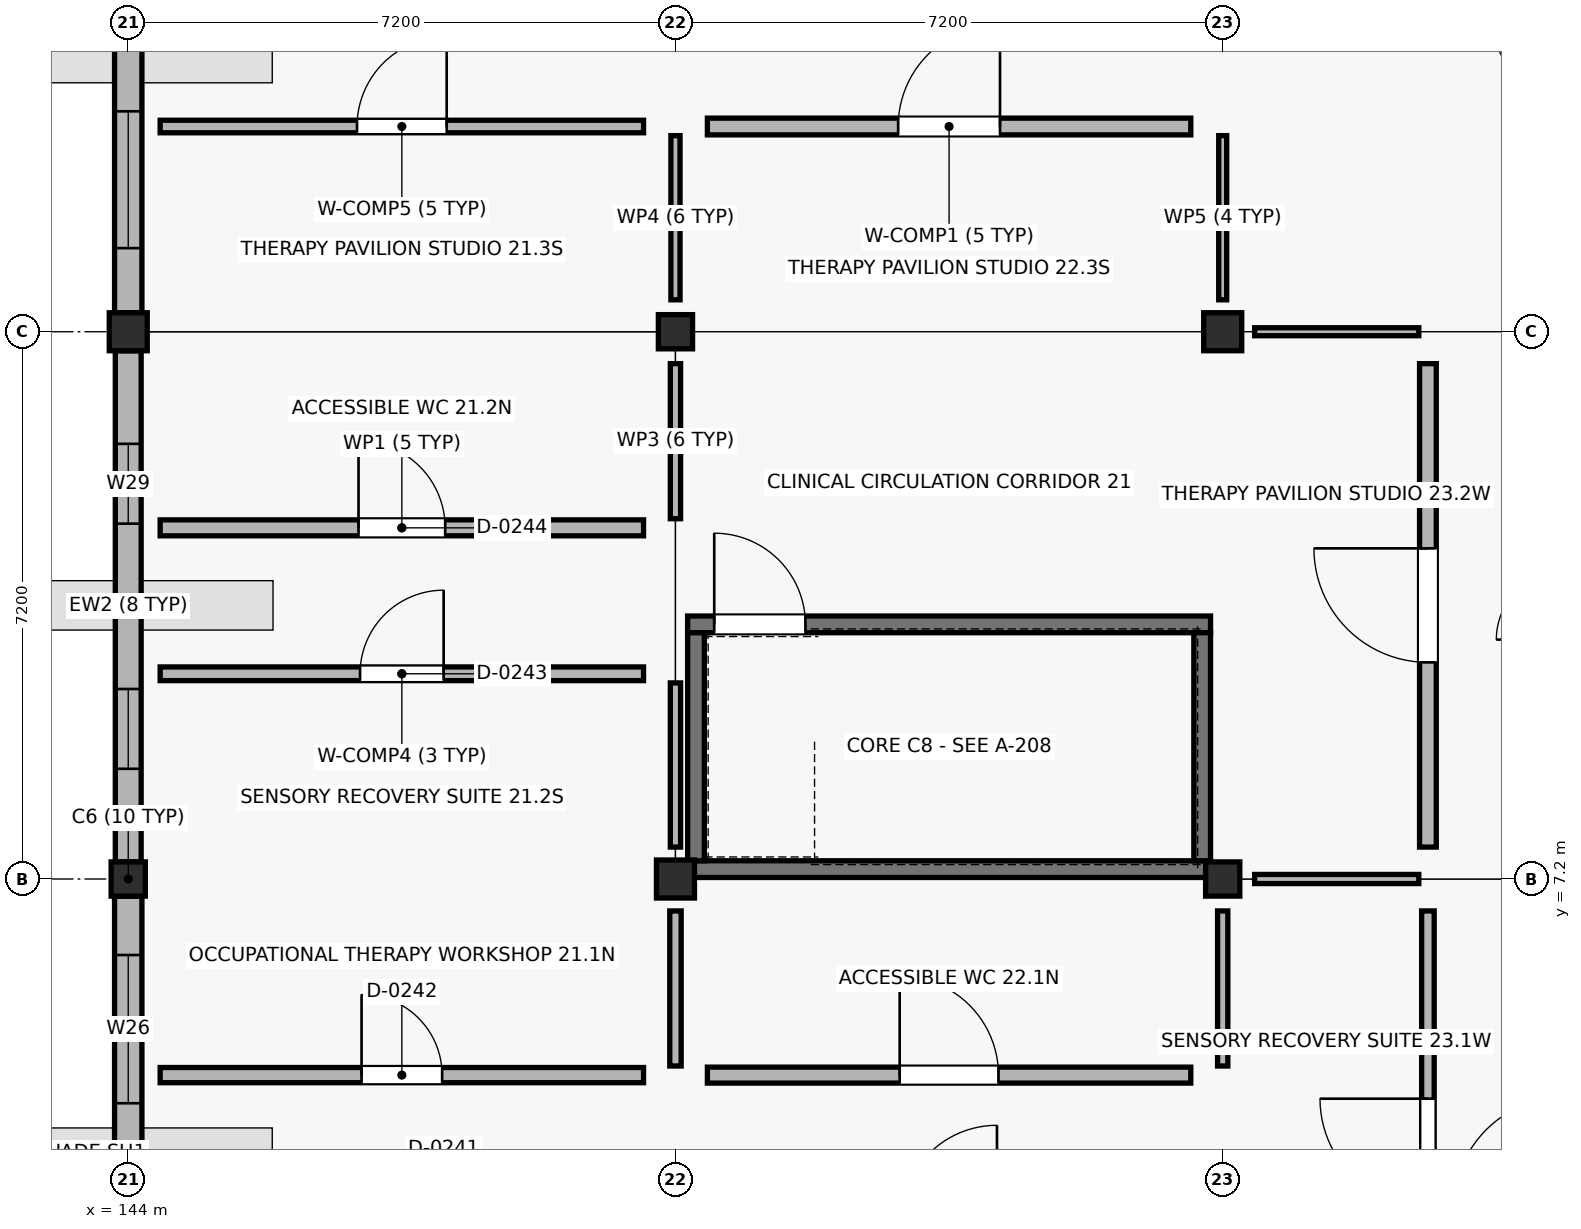
"""IFC4 building model, lengths in metres.
Left out: names, types, materials, properties, quantities, classifications, styles, units other than length and angle.
Written with IfcOpenShell. Run it as: python <this file> out.ifc"""

import sys

from ifc_helpers import new_model, si_unit, direction, frame, frame_2d, origin, origin_2d, place, context, subcontext, project, spatial, rectangle, extrude, element, fill, save


model = new_model("IFC4")
c1 = context("Model", 3, precision=1e-05, world=origin(), true_north=direction((0.0, 1.0)))
c2 = subcontext(c1, "Body", "Model", "MODEL_VIEW")
j1 = project(units=[si_unit("LENGTHUNIT", "METRE"), si_unit("PLANEANGLEUNIT", "RADIAN")], contexts=[c1])
p1 = place(None, origin())
s1 = spatial("IfcSite", under=j1, at=p1, CompositionType="ELEMENT")
p2 = place(p1, origin())
s2 = spatial("IfcBuilding", under=s1, at=p2, CompositionType="ELEMENT")
p3 = place(p2, frame((0.0, 0.0, 4.5)))
s3 = spatial("IfcBuildingStorey", under=s2, at=p3, CompositionType="ELEMENT", Elevation=4.5)
p4 = place(p3, frame((144.0, 7.2, 0.0), z_axis=(0.0, 0.0, 1.0), x_axis=(1.0, 0.0, 0.0)))
e1 = element("IfcColumn", 1, at=p4, inside=s3, PredefinedType="COLUMN", context=c2, shape_type="SweptSolid", body=[
    extrude(rectangle(XDim=0.45, YDim=0.45, at=origin_2d()), origin(), (0.0, 0.0, 1.0), 4.28),
])
for number, where, z_axis, x_axis in (
    (2, (144.0, 14.4, 0.0), (0.0, 0.0, 1.0), (1.0, 0.0, 0.0)),
    (3, (151.2, 7.2, 0.0), (0.0, 0.0, 1.0), (1.0, 0.0, 0.0)),
):
    element("IfcColumn", number, at=place(p3, frame(where, z_axis=z_axis, x_axis=x_axis)), inside=s3, PredefinedType="COLUMN", context=c2, shape_type="SweptSolid", body=[
        extrude(rectangle(XDim=0.5, YDim=0.5, at=origin_2d()), origin(), (0.0, 0.0, 1.0), 4.28),
    ])
for number, where, z_axis, x_axis in (
    (4, (151.2, 14.4, 0.0), (0.0, 0.0, 1.0), (1.0, 0.0, 0.0)),
    (5, (158.4, 7.2, 0.0), (0.0, 0.0, 1.0), (1.0, 0.0, 0.0)),
):
    element("IfcColumn", number, at=place(p3, frame(where, z_axis=z_axis, x_axis=x_axis)), inside=s3, PredefinedType="COLUMN", context=c2, shape_type="SweptSolid", body=[
        extrude(rectangle(XDim=0.45, YDim=0.45, at=origin_2d()), origin(), (0.0, 0.0, 1.0), 4.28),
    ])
p5 = place(p3, frame((158.4, 14.4, 0.0), z_axis=(0.0, 0.0, 1.0), x_axis=(1.0, 0.0, 0.0)))
e6 = element("IfcColumn", 6, at=p5, inside=s3, PredefinedType="COLUMN", context=c2, shape_type="SweptSolid", body=[
    extrude(rectangle(XDim=0.5, YDim=0.5, at=origin_2d()), origin(), (0.0, 0.0, 1.0), 4.28),
])
p6 = place(p3, frame((144.0, 6.975, 0.0), z_axis=(0.0, 0.0, 1.0), x_axis=(0.0, -1.0, 0.0)))
e7 = element("IfcWall", 7, at=p6, inside=s3, PredefinedType="SOLIDWALL", context=c2, shape_type="SweptSolid", body=[
    extrude(rectangle(XDim=6.725, YDim=0.36, at=frame_2d((3.363, 0.0))), origin(), (0.0, 0.0, 1.0), 3.52),
])
p7 = place(p6, frame((0.775, 0.0, 0.9)))
e8 = element("IfcOpeningElement", 8, at=p7, cuts=e7, PredefinedType="OPENING", context=c2, shape_type="SweptSolid", body=[
    extrude(rectangle(XDim=1.95, YDim=1.5, at=frame_2d((0.975, 0.75))), frame((0.0, 0.19, 0.0), z_axis=(0.0, -1.0, 0.0), x_axis=(1.0, 0.0, 0.0)), (0.0, 0.0, 1.0), 0.38),
])
p8 = place(p6, frame((4.0, 0.0, 0.9)))
e9 = element("IfcOpeningElement", 9, at=p8, cuts=e7, PredefinedType="OPENING", context=c2, shape_type="SweptSolid", body=[
    extrude(rectangle(XDim=1.95, YDim=1.5, at=frame_2d((0.975, 0.75))), frame((0.0, 0.19, 0.0), z_axis=(0.0, -1.0, 0.0), x_axis=(1.0, 0.0, 0.0)), (0.0, 0.0, 1.0), 0.38),
])
p9 = place(p3, frame((144.0, 14.15, 0.0), z_axis=(0.0, 0.0, 1.0), x_axis=(0.0, -1.0, 0.0)))
e10 = element("IfcWall", 10, at=p9, inside=s3, PredefinedType="SOLIDWALL", context=c2, shape_type="SweptSolid", body=[
    extrude(rectangle(XDim=6.725, YDim=0.34, at=frame_2d((3.362, 0.0))), origin(), (0.0, 0.0, 1.0), 3.52),
])
p10 = place(p9, frame((1.225, 0.0, 0.9)))
e11 = element("IfcOpeningElement", 11, at=p10, cuts=e10, PredefinedType="OPENING", context=c2, shape_type="SweptSolid", body=[
    extrude(rectangle(XDim=1.05, YDim=1.62, at=frame_2d((0.525, 0.81))), frame((0.0, 0.18, 0.0), z_axis=(0.0, -1.0, 0.0), x_axis=(1.0, 0.0, 0.0)), (0.0, 0.0, 1.0), 0.36),
])
p11 = place(p9, frame((4.45, 0.0, 0.9)))
e12 = element("IfcOpeningElement", 12, at=p11, cuts=e10, PredefinedType="OPENING", context=c2, shape_type="SweptSolid", body=[
    extrude(rectangle(XDim=1.05, YDim=1.62, at=frame_2d((0.525, 0.81))), frame((0.0, 0.18, 0.0), z_axis=(0.0, -1.0, 0.0), x_axis=(1.0, 0.0, 0.0)), (0.0, 0.0, 1.0), 0.36),
])
p12 = place(p3, frame((144.0, 21.375, 0.0), z_axis=(0.0, 0.0, 1.0), x_axis=(0.0, -1.0, 0.0)))
e13 = element("IfcWall", 13, at=p12, inside=s3, PredefinedType="SOLIDWALL", context=c2, shape_type="SweptSolid", body=[
    extrude(rectangle(XDim=6.725, YDim=0.36, at=frame_2d((3.363, 0.0))), origin(), (0.0, 0.0, 1.0), 3.52),
])
p13 = place(p12, frame((0.85, 0.0, 0.9)))
e14 = element("IfcOpeningElement", 14, at=p13, cuts=e13, PredefinedType="OPENING", context=c2, shape_type="SweptSolid", body=[
    extrude(rectangle(XDim=1.8, YDim=1.62, at=frame_2d((0.9, 0.81))), frame((0.0, 0.19, 0.0), z_axis=(0.0, -1.0, 0.0), x_axis=(1.0, 0.0, 0.0)), (0.0, 0.0, 1.0), 0.38),
])
p14 = place(p12, frame((4.075, 0.0, 0.9)))
e15 = element("IfcOpeningElement", 15, at=p14, cuts=e13, PredefinedType="OPENING", context=c2, shape_type="SweptSolid", body=[
    extrude(rectangle(XDim=1.8, YDim=1.62, at=frame_2d((0.9, 0.81))), frame((0.0, 0.19, 0.0), z_axis=(0.0, -1.0, 0.0), x_axis=(1.0, 0.0, 0.0)), (0.0, 0.0, 1.0), 0.38),
])
p15 = place(p3, frame((151.36, 7.33, 0.0), z_axis=(0.0, 0.0, 1.0), x_axis=(1.0, 0.0, 0.0)))
e16 = element("IfcWall", 16, at=p15, inside=s3, PredefinedType="SHEAR", context=c2, shape_type="SweptSolid", body=[
    extrude(rectangle(XDim=6.88, YDim=0.22, at=frame_2d((3.44, 0.0))), origin(), (0.0, 0.0, 1.0), 4.22),
])
p16 = place(p3, frame((151.36, 10.55, 0.0), z_axis=(0.0, 0.0, 1.0), x_axis=(1.0, 0.0, 0.0)))
e17 = element("IfcWall", 17, at=p16, inside=s3, PredefinedType="SHEAR", context=c2, shape_type="SweptSolid", body=[
    extrude(rectangle(XDim=6.88, YDim=0.22, at=frame_2d((3.44, 0.0))), origin(), (0.0, 0.0, 1.0), 4.22),
])
p17 = place(p16, frame((0.35, 0.0, 0.0)))
e18 = element("IfcOpeningElement", 18, at=p17, cuts=e17, PredefinedType="OPENING", context=c2, shape_type="SweptSolid", body=[
    extrude(rectangle(XDim=1.2, YDim=2.15, at=frame_2d((0.6, 1.075))), frame((0.0, 0.12, 0.0), z_axis=(0.0, -1.0, 0.0), x_axis=(1.0, 0.0, 0.0)), (0.0, 0.0, 1.0), 0.24),
])
for number, where, z_axis, x_axis in (
    (19, (151.47, 7.44, 0.0), (0.0, 0.0, 1.0), (0.0, 1.0, 0.0)),
    (20, (158.13, 7.44, 0.0), (0.0, 0.0, 1.0), (0.0, 1.0, 0.0)),
):
    element("IfcWall", number, at=place(p3, frame(where, z_axis=z_axis, x_axis=x_axis)), inside=s3, PredefinedType="SHEAR", context=c2, shape_type="SweptSolid", body=[
        extrude(rectangle(XDim=3.0, YDim=0.22, at=frame_2d((1.5, 0.0))), origin(), (0.0, 0.0, 1.0), 4.22),
    ])
p18 = place(p3, frame((144.42, 4.62, 0.0), z_axis=(0.0, 0.0, 1.0), x_axis=(1.0, 0.0, 0.0)))
e21 = element("IfcWall", 21, at=p18, inside=s3, PredefinedType="SOLIDWALL", context=c2, shape_type="SweptSolid", body=[
    extrude(rectangle(XDim=6.36, YDim=0.2, at=frame_2d((3.18, 0.0))), origin(), (0.0, 0.0, 1.0), 3.36),
])
p19 = place(p18, frame((2.65, 0.0, 0.0)))
e22 = element("IfcOpeningElement", 22, at=p19, cuts=e21, PredefinedType="OPENING", context=c2, shape_type="SweptSolid", body=[
    extrude(rectangle(XDim=1.06, YDim=2.09, at=frame_2d((0.53, 1.045))), frame((0.0, 0.11, 0.0), z_axis=(0.0, -1.0, 0.0), x_axis=(1.0, 0.0, 0.0)), (0.0, 0.0, 1.0), 0.22),
])
p20 = place(p3, frame((151.2, 4.74, 0.0), z_axis=(0.0, 0.0, 1.0), x_axis=(0.0, 1.0, 0.0)))
e23 = element("IfcWall", 23, at=p20, inside=s3, PredefinedType="PARTITIONING", context=c2, shape_type="SweptSolid", body=[
    extrude(rectangle(XDim=2.04, YDim=0.15, at=frame_2d((1.02, 0.0))), origin(), (0.0, 0.0, 1.0), 3.36),
])
p21 = place(p3, frame((144.42, 9.9, 0.0), z_axis=(0.0, 0.0, 1.0), x_axis=(1.0, 0.0, 0.0)))
e24 = element("IfcWall", 24, at=p21, inside=s3, PredefinedType="PARTITIONING", context=c2, shape_type="SweptSolid", body=[
    extrude(rectangle(XDim=6.36, YDim=0.18, at=frame_2d((3.18, 0.0))), origin(), (0.0, 0.0, 1.0), 3.36),
])
p22 = place(p21, frame((2.63, 0.0, 0.0)))
e25 = element("IfcOpeningElement", 25, at=p22, cuts=e24, PredefinedType="OPENING", context=c2, shape_type="SweptSolid", body=[
    extrude(rectangle(XDim=1.1, YDim=2.09, at=frame_2d((0.55, 1.045))), frame((0.0, 0.1, 0.0), z_axis=(0.0, -1.0, 0.0), x_axis=(1.0, 0.0, 0.0)), (0.0, 0.0, 1.0), 0.2),
])
p23 = place(p3, frame((151.2, 7.62, 0.0), z_axis=(0.0, 0.0, 1.0), x_axis=(0.0, 1.0, 0.0)))
e26 = element("IfcWall", 26, at=p23, inside=s3, PredefinedType="PARTITIONING", context=c2, shape_type="SweptSolid", body=[
    extrude(rectangle(XDim=2.16, YDim=0.135, at=frame_2d((1.08, 0.0))), origin(), (0.0, 0.0, 1.0), 3.36),
])
p24 = place(p3, frame((144.42, 11.82, 0.0), z_axis=(0.0, 0.0, 1.0), x_axis=(1.0, 0.0, 0.0)))
e27 = element("IfcWall", 27, at=p24, inside=s3, PredefinedType="PLUMBINGWALL", context=c2, shape_type="SweptSolid", body=[
    extrude(rectangle(XDim=6.36, YDim=0.21, at=frame_2d((3.18, 0.0))), origin(), (0.0, 0.0, 1.0), 3.36),
])
p25 = place(p24, frame((2.61, 0.0, 0.0)))
e28 = element("IfcOpeningElement", 28, at=p25, cuts=e27, PredefinedType="OPENING", context=c2, shape_type="SweptSolid", body=[
    extrude(rectangle(XDim=1.14, YDim=2.09, at=frame_2d((0.57, 1.045))), frame((0.0, 0.115, 0.0), z_axis=(0.0, -1.0, 0.0), x_axis=(1.0, 0.0, 0.0)), (0.0, 0.0, 1.0), 0.23),
])
p26 = place(p3, frame((151.2, 11.94, 0.0), z_axis=(0.0, 0.0, 1.0), x_axis=(0.0, 1.0, 0.0)))
e29 = element("IfcWall", 29, at=p26, inside=s3, PredefinedType="PARTITIONING", context=c2, shape_type="SweptSolid", body=[
    extrude(rectangle(XDim=2.04, YDim=0.135, at=frame_2d((1.02, 0.0))), origin(), (0.0, 0.0, 1.0), 3.36),
])
p27 = place(p3, frame((144.42, 17.1, 0.0), z_axis=(0.0, 0.0, 1.0), x_axis=(1.0, 0.0, 0.0)))
e30 = element("IfcWall", 30, at=p27, inside=s3, PredefinedType="PARTITIONING", context=c2, shape_type="SweptSolid", body=[
    extrude(rectangle(XDim=6.36, YDim=0.165, at=frame_2d((3.18, 0.0))), origin(), (0.0, 0.0, 1.0), 3.36),
])
p28 = place(p27, frame((2.59, 0.0, 0.0)))
e31 = element("IfcOpeningElement", 31, at=p28, cuts=e30, PredefinedType="OPENING", context=c2, shape_type="SweptSolid", body=[
    extrude(rectangle(XDim=1.18, YDim=2.09, at=frame_2d((0.59, 1.045))), frame((0.0, 0.093, 0.0), z_axis=(0.0, -1.0, 0.0), x_axis=(1.0, 0.0, 0.0)), (0.0, 0.0, 1.0), 0.185),
])
p29 = place(p3, frame((151.2, 14.82, 0.0), z_axis=(0.0, 0.0, 1.0), x_axis=(0.0, 1.0, 0.0)))
e32 = element("IfcWall", 32, at=p29, inside=s3, PredefinedType="PARTITIONING", context=c2, shape_type="SweptSolid", body=[
    extrude(rectangle(XDim=2.16, YDim=0.12, at=frame_2d((1.08, 0.0))), origin(), (0.0, 0.0, 1.0), 3.36),
])
p30 = place(p3, frame((151.62, 4.62, 0.0), z_axis=(0.0, 0.0, 1.0), x_axis=(1.0, 0.0, 0.0)))
e33 = element("IfcWall", 33, at=p30, inside=s3, PredefinedType="PLUMBINGWALL", context=c2, shape_type="SweptSolid", body=[
    extrude(rectangle(XDim=6.36, YDim=0.21, at=frame_2d((3.18, 0.0))), origin(), (0.0, 0.0, 1.0), 3.36),
])
p31 = place(p30, frame((2.53, 0.0, 0.0)))
e34 = element("IfcOpeningElement", 34, at=p31, cuts=e33, PredefinedType="OPENING", context=c2, shape_type="SweptSolid", body=[
    extrude(rectangle(XDim=1.3, YDim=2.09, at=frame_2d((0.65, 1.045))), frame((0.0, 0.115, 0.0), z_axis=(0.0, -1.0, 0.0), x_axis=(1.0, 0.0, 0.0)), (0.0, 0.0, 1.0), 0.23),
])
p32 = place(p3, frame((158.4, 4.74, 0.0), z_axis=(0.0, 0.0, 1.0), x_axis=(0.0, 1.0, 0.0)))
e35 = element("IfcWall", 35, at=p32, inside=s3, PredefinedType="PARTITIONING", context=c2, shape_type="SweptSolid", body=[
    extrude(rectangle(XDim=2.04, YDim=0.135, at=frame_2d((1.02, 0.0))), origin(), (0.0, 0.0, 1.0), 3.36),
])
p33 = place(p3, frame((151.62, 17.1, 0.0), z_axis=(0.0, 0.0, 1.0), x_axis=(1.0, 0.0, 0.0)))
e36 = element("IfcWall", 36, at=p33, inside=s3, PredefinedType="SOLIDWALL", context=c2, shape_type="SweptSolid", body=[
    extrude(rectangle(XDim=6.36, YDim=0.22, at=frame_2d((3.18, 0.0))), origin(), (0.0, 0.0, 1.0), 3.36),
])
p34 = place(p33, frame((2.51, 0.0, 0.0)))
e37 = element("IfcOpeningElement", 37, at=p34, cuts=e36, PredefinedType="OPENING", context=c2, shape_type="SweptSolid", body=[
    extrude(rectangle(XDim=1.34, YDim=2.09, at=frame_2d((0.67, 1.045))), frame((0.0, 0.12, 0.0), z_axis=(0.0, -1.0, 0.0), x_axis=(1.0, 0.0, 0.0)), (0.0, 0.0, 1.0), 0.24),
])
p35 = place(p3, frame((158.4, 14.82, 0.0), z_axis=(0.0, 0.0, 1.0), x_axis=(0.0, 1.0, 0.0)))
e38 = element("IfcWall", 38, at=p35, inside=s3, PredefinedType="PARTITIONING", context=c2, shape_type="SweptSolid", body=[
    extrude(rectangle(XDim=2.16, YDim=0.105, at=frame_2d((1.08, 0.0))), origin(), (0.0, 0.0, 1.0), 3.36),
])
p36 = place(p3, frame((161.1, 0.42, 0.0), z_axis=(0.0, 0.0, 1.0), x_axis=(0.0, 1.0, 0.0)))
e39 = element("IfcWall", 39, at=p36, inside=s3, PredefinedType="PARTITIONING", context=c2, shape_type="SweptSolid", body=[
    extrude(rectangle(XDim=6.36, YDim=0.165, at=frame_2d((3.18, 0.0))), origin(), (0.0, 0.0, 1.0), 3.36),
])
p37 = place(p36, frame((2.47, 0.0, 0.0)))
e40 = element("IfcOpeningElement", 40, at=p37, cuts=e39, PredefinedType="OPENING", context=c2, shape_type="SweptSolid", body=[
    extrude(rectangle(XDim=1.42, YDim=2.09, at=frame_2d((0.71, 1.045))), frame((0.0, 0.093, 0.0), z_axis=(0.0, -1.0, 0.0), x_axis=(1.0, 0.0, 0.0)), (0.0, 0.0, 1.0), 0.185),
])
p38 = place(p3, frame((158.82, 7.2, 0.0), z_axis=(0.0, 0.0, 1.0), x_axis=(1.0, 0.0, 0.0)))
e41 = element("IfcWall", 41, at=p38, inside=s3, PredefinedType="PARTITIONING", context=c2, shape_type="SweptSolid", body=[
    extrude(rectangle(XDim=2.16, YDim=0.12, at=frame_2d((1.08, 0.0))), origin(), (0.0, 0.0, 1.0), 3.36),
])
p39 = place(p3, frame((161.1, 7.62, 0.0), z_axis=(0.0, 0.0, 1.0), x_axis=(0.0, 1.0, 0.0)))
e42 = element("IfcWall", 42, at=p39, inside=s3, PredefinedType="SOLIDWALL", context=c2, shape_type="SweptSolid", body=[
    extrude(rectangle(XDim=6.36, YDim=0.22, at=frame_2d((3.18, 0.0))), origin(), (0.0, 0.0, 1.0), 3.36),
])
p40 = place(p39, frame((2.43, 0.0, 0.0)))
e43 = element("IfcOpeningElement", 43, at=p40, cuts=e42, PredefinedType="OPENING", context=c2, shape_type="SweptSolid", body=[
    extrude(rectangle(XDim=1.5, YDim=2.09, at=frame_2d((0.75, 1.045))), frame((0.0, 0.12, 0.0), z_axis=(0.0, -1.0, 0.0), x_axis=(1.0, 0.0, 0.0)), (0.0, 0.0, 1.0), 0.24),
])
p41 = place(p3, frame((158.82, 14.4, 0.0), z_axis=(0.0, 0.0, 1.0), x_axis=(1.0, 0.0, 0.0)))
e44 = element("IfcWall", 44, at=p41, inside=s3, PredefinedType="PARTITIONING", context=c2, shape_type="SweptSolid", body=[
    extrude(rectangle(XDim=2.16, YDim=0.105, at=frame_2d((1.08, 0.0))), origin(), (0.0, 0.0, 1.0), 3.36),
])
p42 = place(p7, origin())
e45 = element("IfcWindow", 45, at=p42, inside=s3, PartitioningType="SINGLE_PANEL", PredefinedType="WINDOW", context=c2, shape_type="SweptSolid", body=[
    extrude(rectangle(XDim=1.95, YDim=1.5, at=frame_2d((0.975, 0.75))), frame((0.0, 0.03, 0.0), z_axis=(0.0, -1.0, 0.0), x_axis=(1.0, 0.0, 0.0)), (0.0, 0.0, 1.0), 0.06),
])
fill(e8, e45)
p43 = place(p10, origin())
e46 = element("IfcWindow", 46, at=p43, inside=s3, PartitioningType="SINGLE_PANEL", PredefinedType="WINDOW", context=c2, shape_type="SweptSolid", body=[
    extrude(rectangle(XDim=1.05, YDim=1.62, at=frame_2d((0.525, 0.81))), frame((0.0, 0.03, 0.0), z_axis=(0.0, -1.0, 0.0), x_axis=(1.0, 0.0, 0.0)), (0.0, 0.0, 1.0), 0.06),
])
fill(e11, e46)
p44 = place(p11, origin())
e47 = element("IfcWindow", 47, at=p44, inside=s3, PartitioningType="SINGLE_PANEL", PredefinedType="WINDOW", context=c2, shape_type="SweptSolid", body=[
    extrude(rectangle(XDim=1.05, YDim=1.62, at=frame_2d((0.525, 0.81))), frame((0.0, 0.03, 0.0), z_axis=(0.0, -1.0, 0.0), x_axis=(1.0, 0.0, 0.0)), (0.0, 0.0, 1.0), 0.06),
])
fill(e12, e47)
p45 = place(p14, origin())
e48 = element("IfcWindow", 48, at=p45, inside=s3, PartitioningType="SINGLE_PANEL", PredefinedType="WINDOW", context=c2, shape_type="SweptSolid", body=[
    extrude(rectangle(XDim=1.8, YDim=1.62, at=frame_2d((0.9, 0.81))), frame((0.0, 0.03, 0.0), z_axis=(0.0, -1.0, 0.0), x_axis=(1.0, 0.0, 0.0)), (0.0, 0.0, 1.0), 0.06),
])
fill(e15, e48)
p46 = place(p17, origin())
e49 = element("IfcDoor", 49, at=p46, inside=s3, OperationType="SINGLE_SWING_LEFT", PredefinedType="DOOR", context=c2, shape_type="SweptSolid", body=[
    extrude(rectangle(XDim=1.2, YDim=2.15, at=frame_2d((0.6, 1.075))), frame((0.0, 0.025, 0.0), z_axis=(0.0, -1.0, 0.0), x_axis=(1.0, 0.0, 0.0)), (0.0, 0.0, 1.0), 0.05),
])
fill(e18, e49)
p47 = place(p19, origin())
e50 = element("IfcDoor", 50, at=p47, inside=s3, OperationType="SINGLE_SWING_LEFT", PredefinedType="DOOR", context=c2, shape_type="SweptSolid", body=[
    extrude(rectangle(XDim=1.06, YDim=2.09, at=frame_2d((0.53, 1.045))), frame((0.0, 0.025, 0.0), z_axis=(0.0, -1.0, 0.0), x_axis=(1.0, 0.0, 0.0)), (0.0, 0.0, 1.0), 0.05),
])
fill(e22, e50)
p48 = place(p22, origin())
e51 = element("IfcDoor", 51, at=p48, inside=s3, OperationType="SINGLE_SWING_RIGHT", PredefinedType="DOOR", context=c2, shape_type="SweptSolid", body=[
    extrude(rectangle(XDim=1.1, YDim=2.09, at=frame_2d((0.55, 1.045))), frame((0.0, 0.025, 0.0), z_axis=(0.0, -1.0, 0.0), x_axis=(1.0, 0.0, 0.0)), (0.0, 0.0, 1.0), 0.05),
])
fill(e25, e51)
p49 = place(p25, origin())
e52 = element("IfcDoor", 52, at=p49, inside=s3, OperationType="SINGLE_SWING_LEFT", PredefinedType="DOOR", context=c2, shape_type="SweptSolid", body=[
    extrude(rectangle(XDim=1.14, YDim=2.09, at=frame_2d((0.57, 1.045))), frame((0.0, 0.025, 0.0), z_axis=(0.0, -1.0, 0.0), x_axis=(1.0, 0.0, 0.0)), (0.0, 0.0, 1.0), 0.05),
])
fill(e28, e52)
p50 = place(p28, origin())
e53 = element("IfcDoor", 53, at=p50, inside=s3, OperationType="SINGLE_SWING_RIGHT", PredefinedType="DOOR", context=c2, shape_type="SweptSolid", body=[
    extrude(rectangle(XDim=1.18, YDim=2.09, at=frame_2d((0.59, 1.045))), frame((0.0, 0.025, 0.0), z_axis=(0.0, -1.0, 0.0), x_axis=(1.0, 0.0, 0.0)), (0.0, 0.0, 1.0), 0.05),
])
fill(e31, e53)
p51 = place(p31, origin())
e54 = element("IfcDoor", 54, at=p51, inside=s3, OperationType="SINGLE_SWING_LEFT", PredefinedType="DOOR", context=c2, shape_type="SweptSolid", body=[
    extrude(rectangle(XDim=1.3, YDim=2.09, at=frame_2d((0.65, 1.045))), frame((0.0, 0.025, 0.0), z_axis=(0.0, -1.0, 0.0), x_axis=(1.0, 0.0, 0.0)), (0.0, 0.0, 1.0), 0.05),
])
fill(e34, e54)
p52 = place(p34, origin())
e55 = element("IfcDoor", 55, at=p52, inside=s3, OperationType="SINGLE_SWING_RIGHT", PredefinedType="DOOR", context=c2, shape_type="SweptSolid", body=[
    extrude(rectangle(XDim=1.34, YDim=2.09, at=frame_2d((0.67, 1.045))), frame((0.0, 0.025, 0.0), z_axis=(0.0, -1.0, 0.0), x_axis=(1.0, 0.0, 0.0)), (0.0, 0.0, 1.0), 0.05),
])
fill(e37, e55)
p53 = place(p37, origin())
e56 = element("IfcDoor", 56, at=p53, inside=s3, OperationType="SINGLE_SWING_RIGHT", PredefinedType="DOOR", context=c2, shape_type="SweptSolid", body=[
    extrude(rectangle(XDim=1.42, YDim=2.09, at=frame_2d((0.71, 1.045))), frame((0.0, 0.025, 0.0), z_axis=(0.0, -1.0, 0.0), x_axis=(1.0, 0.0, 0.0)), (0.0, 0.0, 1.0), 0.05),
])
fill(e40, e56)
p54 = place(p40, origin())
e57 = element("IfcDoor", 57, at=p54, inside=s3, OperationType="SINGLE_SWING_RIGHT", PredefinedType="DOOR", context=c2, shape_type="SweptSolid", body=[
    extrude(rectangle(XDim=1.5, YDim=2.09, at=frame_2d((0.75, 1.045))), frame((0.0, 0.025, 0.0), z_axis=(0.0, -1.0, 0.0), x_axis=(1.0, 0.0, 0.0)), (0.0, 0.0, 1.0), 0.05),
])
fill(e43, e57)
save(model, sys.argv[1])
